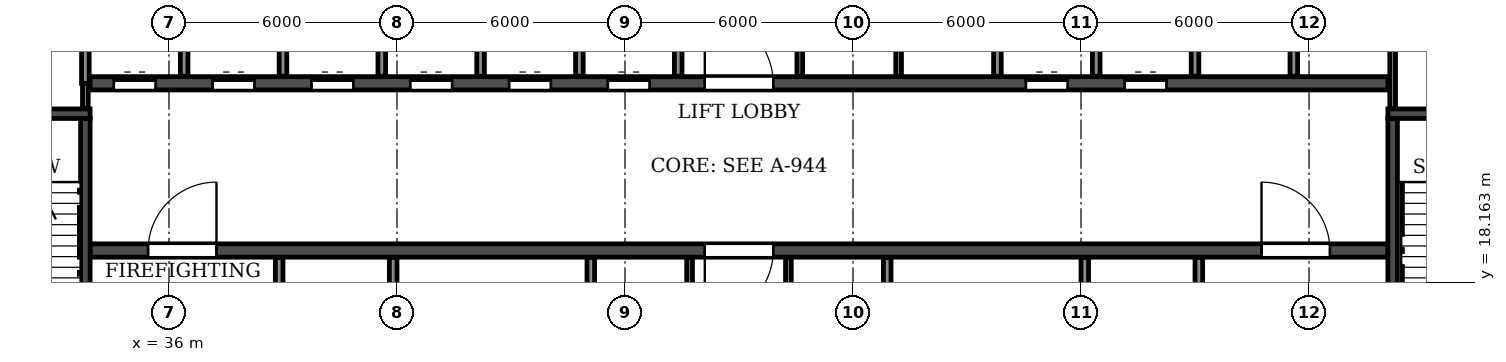
"""IFC4 building model, lengths in metres.
Left out: names, types, materials, properties, quantities, classifications, styles, units other than length and angle.
Written with IfcOpenShell. Run it as: python <this file> out.ifc"""

import sys

from ifc_helpers import new_model, si_unit, direction, frame, frame_2d, origin, place, context, subcontext, project, spatial, rectangle, extrude, element, fill, save


model = new_model("IFC4")
c1 = context("Model", 3, precision=1e-05, world=origin(), true_north=direction((0.0, 1.0)))
c2 = subcontext(c1, "Body", "Model", "MODEL_VIEW")
j1 = project(units=[si_unit("LENGTHUNIT", "METRE"), si_unit("PLANEANGLEUNIT", "RADIAN")], contexts=[c1])
p1 = place(None, origin())
s1 = spatial("IfcSite", under=j1, at=p1, CompositionType="ELEMENT")
p2 = place(p1, origin())
s2 = spatial("IfcBuilding", under=s1, at=p2, CompositionType="ELEMENT")
p3 = place(p2, frame((0.0, 0.0, 261.0)))
s3 = spatial("IfcBuildingStorey", under=s2, at=p3, CompositionType="ELEMENT", Elevation=261.0)
p4 = place(p3, frame((33.925, 19.0, 0.0), z_axis=(0.0, 0.0, 1.0), x_axis=(1.0, 0.0, 0.0)))
e1 = element("IfcWall", 1, at=p4, inside=s3, PredefinedType="SOLIDWALL", context=c2, shape_type="SweptSolid", body=[
    extrude(rectangle(XDim=34.15, YDim=0.35, at=frame_2d((17.075, 0.0))), origin(), (0.0, 0.0, 1.0), 5.7),
])
p5 = place(p4, frame((16.175, 0.0, 0.0)))
e2 = element("IfcOpeningElement", 2, at=p5, cuts=e1, PredefinedType="OPENING", context=c2, shape_type="SweptSolid", body=[
    extrude(rectangle(XDim=1.8, YDim=2.1, at=frame_2d((0.9, 1.05))), frame((0.0, 0.185, 0.0), z_axis=(0.0, -1.0, 0.0), x_axis=(1.0, 0.0, 0.0)), (0.0, 0.0, 1.0), 0.37),
])
p6 = place(p4, frame((1.525, 0.0, 0.0)))
e3 = element("IfcOpeningElement", 3, at=p6, cuts=e1, PredefinedType="OPENING", context=c2, shape_type="SweptSolid", body=[
    extrude(rectangle(XDim=1.8, YDim=2.1, at=frame_2d((0.9, 1.05))), frame((0.0, 0.185, 0.0), z_axis=(0.0, -1.0, 0.0), x_axis=(1.0, 0.0, 0.0)), (0.0, 0.0, 1.0), 0.37),
])
p7 = place(p4, frame((30.825, 0.0, 0.0)))
e4 = element("IfcOpeningElement", 4, at=p7, cuts=e1, PredefinedType="OPENING", context=c2, shape_type="SweptSolid", body=[
    extrude(rectangle(XDim=1.8, YDim=2.1, at=frame_2d((0.9, 1.05))), frame((0.0, 0.185, 0.0), z_axis=(0.0, -1.0, 0.0), x_axis=(1.0, 0.0, 0.0)), (0.0, 0.0, 1.0), 0.37),
])
p8 = place(p3, frame((33.925, 23.4, 0.0), z_axis=(0.0, 0.0, 1.0), x_axis=(1.0, 0.0, 0.0)))
e5 = element("IfcWall", 5, at=p8, inside=s3, PredefinedType="SOLIDWALL", context=c2, shape_type="SweptSolid", body=[
    extrude(rectangle(XDim=34.15, YDim=0.35, at=frame_2d((17.075, 0.0))), origin(), (0.0, 0.0, 1.0), 5.7),
])
p9 = place(p8, frame((16.175, 0.0, 0.0)))
e6 = element("IfcOpeningElement", 6, at=p9, cuts=e5, PredefinedType="OPENING", context=c2, shape_type="SweptSolid", body=[
    extrude(rectangle(XDim=1.8, YDim=2.1, at=frame_2d((0.9, 1.05))), frame((0.0, 0.185, 0.0), z_axis=(0.0, -1.0, 0.0), x_axis=(1.0, 0.0, 0.0)), (0.0, 0.0, 1.0), 0.37),
])
p10 = place(p8, frame((0.625, 0.0, 0.0)))
e7 = element("IfcOpeningElement", 7, at=p10, cuts=e5, PredefinedType="OPENING", context=c2, shape_type="SweptSolid", body=[
    extrude(rectangle(XDim=1.1, YDim=2.1, at=frame_2d((0.55, 1.05))), frame((0.0, 0.185, 0.0), z_axis=(0.0, -1.0, 0.0), x_axis=(1.0, 0.0, 0.0)), (0.0, 0.0, 1.0), 0.37),
])
p11 = place(p8, frame((3.225, 0.0, 0.0)))
e8 = element("IfcOpeningElement", 8, at=p11, cuts=e5, PredefinedType="OPENING", context=c2, shape_type="SweptSolid", body=[
    extrude(rectangle(XDim=1.1, YDim=2.1, at=frame_2d((0.55, 1.05))), frame((0.0, 0.185, 0.0), z_axis=(0.0, -1.0, 0.0), x_axis=(1.0, 0.0, 0.0)), (0.0, 0.0, 1.0), 0.37),
])
p12 = place(p8, frame((5.825, 0.0, 0.0)))
e9 = element("IfcOpeningElement", 9, at=p12, cuts=e5, PredefinedType="OPENING", context=c2, shape_type="SweptSolid", body=[
    extrude(rectangle(XDim=1.1, YDim=2.1, at=frame_2d((0.55, 1.05))), frame((0.0, 0.185, 0.0), z_axis=(0.0, -1.0, 0.0), x_axis=(1.0, 0.0, 0.0)), (0.0, 0.0, 1.0), 0.37),
])
p13 = place(p8, frame((8.425, 0.0, 0.0)))
e10 = element("IfcOpeningElement", 10, at=p13, cuts=e5, PredefinedType="OPENING", context=c2, shape_type="SweptSolid", body=[
    extrude(rectangle(XDim=1.1, YDim=2.1, at=frame_2d((0.55, 1.05))), frame((0.0, 0.185, 0.0), z_axis=(0.0, -1.0, 0.0), x_axis=(1.0, 0.0, 0.0)), (0.0, 0.0, 1.0), 0.37),
])
p14 = place(p8, frame((11.025, 0.0, 0.0)))
e11 = element("IfcOpeningElement", 11, at=p14, cuts=e5, PredefinedType="OPENING", context=c2, shape_type="SweptSolid", body=[
    extrude(rectangle(XDim=1.1, YDim=2.1, at=frame_2d((0.55, 1.05))), frame((0.0, 0.185, 0.0), z_axis=(0.0, -1.0, 0.0), x_axis=(1.0, 0.0, 0.0)), (0.0, 0.0, 1.0), 0.37),
])
p15 = place(p8, frame((13.625, 0.0, 0.0)))
e12 = element("IfcOpeningElement", 12, at=p15, cuts=e5, PredefinedType="OPENING", context=c2, shape_type="SweptSolid", body=[
    extrude(rectangle(XDim=1.1, YDim=2.1, at=frame_2d((0.55, 1.05))), frame((0.0, 0.185, 0.0), z_axis=(0.0, -1.0, 0.0), x_axis=(1.0, 0.0, 0.0)), (0.0, 0.0, 1.0), 0.37),
])
p16 = place(p8, frame((24.625, 0.0, 0.0)))
e13 = element("IfcOpeningElement", 13, at=p16, cuts=e5, PredefinedType="OPENING", context=c2, shape_type="SweptSolid", body=[
    extrude(rectangle(XDim=1.1, YDim=2.1, at=frame_2d((0.55, 1.05))), frame((0.0, 0.185, 0.0), z_axis=(0.0, -1.0, 0.0), x_axis=(1.0, 0.0, 0.0)), (0.0, 0.0, 1.0), 0.37),
])
p17 = place(p8, frame((27.225, 0.0, 0.0)))
e14 = element("IfcOpeningElement", 14, at=p17, cuts=e5, PredefinedType="OPENING", context=c2, shape_type="SweptSolid", body=[
    extrude(rectangle(XDim=1.1, YDim=2.1, at=frame_2d((0.55, 1.05))), frame((0.0, 0.185, 0.0), z_axis=(0.0, -1.0, 0.0), x_axis=(1.0, 0.0, 0.0)), (0.0, 0.0, 1.0), 0.37),
])
p18 = place(p3, frame((33.8, 14.775, 0.0), z_axis=(0.0, 0.0, 1.0), x_axis=(0.0, 1.0, 0.0)))
e15 = element("IfcWall", 15, at=p18, inside=s3, PredefinedType="SOLIDWALL", context=c2, shape_type="SweptSolid", body=[
    extrude(rectangle(XDim=7.7, YDim=0.25, at=frame_2d((3.85, 0.0))), origin(), (0.0, 0.0, 1.0), 5.7),
])
p19 = place(p18, frame((0.525, 0.0, 0.0)))
e16 = element("IfcOpeningElement", 16, at=p19, cuts=e15, PredefinedType="OPENING", context=c2, shape_type="SweptSolid", body=[
    extrude(rectangle(XDim=1.0, YDim=2.1, at=frame_2d((0.5, 1.05))), frame((0.0, 0.135, 0.0), z_axis=(0.0, -1.0, 0.0), x_axis=(1.0, 0.0, 0.0)), (0.0, 0.0, 1.0), 0.27),
])
p20 = place(p3, frame((29.875, 22.6, 0.0), z_axis=(0.0, 0.0, 1.0), x_axis=(1.0, 0.0, 0.0)))
e17 = element("IfcWall", 17, at=p20, inside=s3, PredefinedType="SOLIDWALL", context=c2, shape_type="SweptSolid", body=[
    extrude(rectangle(XDim=4.05, YDim=0.25, at=frame_2d((2.025, 0.0))), origin(), (0.0, 0.0, 1.0), 5.7),
])
p21 = place(p3, frame((68.2, 14.775, 0.0), z_axis=(0.0, 0.0, 1.0), x_axis=(0.0, 1.0, 0.0)))
e18 = element("IfcWall", 18, at=p21, inside=s3, PredefinedType="SOLIDWALL", context=c2, shape_type="SweptSolid", body=[
    extrude(rectangle(XDim=7.7, YDim=0.25, at=frame_2d((3.85, 0.0))), origin(), (0.0, 0.0, 1.0), 5.7),
])
p22 = place(p21, frame((0.525, 0.0, 0.0)))
e19 = element("IfcOpeningElement", 19, at=p22, cuts=e18, PredefinedType="OPENING", context=c2, shape_type="SweptSolid", body=[
    extrude(rectangle(XDim=1.0, YDim=2.1, at=frame_2d((0.5, 1.05))), frame((0.0, 0.135, 0.0), z_axis=(0.0, -1.0, 0.0), x_axis=(1.0, 0.0, 0.0)), (0.0, 0.0, 1.0), 0.27),
])
p23 = place(p3, frame((68.075, 22.6, 0.0), z_axis=(0.0, 0.0, 1.0), x_axis=(1.0, 0.0, 0.0)))
e20 = element("IfcWall", 20, at=p23, inside=s3, PredefinedType="SOLIDWALL", context=c2, shape_type="SweptSolid", body=[
    extrude(rectangle(XDim=4.05, YDim=0.25, at=frame_2d((2.025, 0.0))), origin(), (0.0, 0.0, 1.0), 5.7),
])
for number, where, z_axis, x_axis in (
    (21, (49.7, 14.785, 0.0), (0.0, 0.0, 1.0), (0.0, 1.0, 0.0)),
    (22, (52.3, 14.785, 0.0), (0.0, 0.0, 1.0), (0.0, 1.0, 0.0)),
    (23, (52.6, 23.585, 0.0), (0.0, 0.0, 1.0), (0.0, 1.0, 0.0)),
    (24, (55.2, 23.585, 0.0), (0.0, 0.0, 1.0), (0.0, 1.0, 0.0)),
):
    element("IfcWall", number, at=place(p3, frame(where, z_axis=z_axis, x_axis=x_axis)), inside=s3, PredefinedType="PARTITIONING", context=c2, shape_type="SweptSolid", body=[
        extrude(rectangle(XDim=4.03, YDim=0.15, at=frame_2d((2.015, 0.0))), origin(), (0.0, 0.0, 1.0), 5.7),
    ])
for number, where, z_axis, x_axis in (
    (25, (47.1, 14.785, 0.0), (0.0, 0.0, 1.0), (0.0, 1.0, 0.0)),
    (26, (54.9, 14.785, 0.0), (0.0, 0.0, 1.0), (0.0, 1.0, 0.0)),
    (27, (65.6, 23.585, 0.0), (0.0, 0.0, 1.0), (0.0, 1.0, 0.0)),
):
    element("IfcWall", number, at=place(p3, frame(where, z_axis=z_axis, x_axis=x_axis)), inside=s3, PredefinedType="PARTITIONING", context=c2, shape_type="SweptSolid", body=[
        extrude(rectangle(XDim=4.03, YDim=0.2, at=frame_2d((2.015, 0.0))), origin(), (0.0, 0.0, 1.0), 5.7),
    ])
p24 = place(p3, frame((33.8, 22.735, 0.0), z_axis=(0.0, 0.0, 1.0), x_axis=(0.0, 1.0, 0.0)))
e28 = element("IfcWall", 28, at=p24, inside=s3, PredefinedType="PARTITIONING", context=c2, shape_type="SweptSolid", body=[
    extrude(rectangle(XDim=0.665, YDim=0.15, at=frame_2d((0.333, 0.0))), origin(), (0.0, 0.0, 1.0), 5.7),
])
p25 = place(p3, frame((68.2, 22.735, 0.0), z_axis=(0.0, 0.0, 1.0), x_axis=(0.0, 1.0, 0.0)))
e29 = element("IfcWall", 29, at=p25, inside=s3, PredefinedType="PARTITIONING", context=c2, shape_type="SweptSolid", body=[
    extrude(rectangle(XDim=4.88, YDim=0.15, at=frame_2d((2.44, 0.0))), origin(), (0.0, 0.0, 1.0), 5.7),
])
p26 = place(p3, frame((33.8, 23.4, 0.0), z_axis=(0.0, 0.0, 1.0), x_axis=(0.0, 1.0, 0.0)))
e30 = element("IfcWall", 30, at=p26, inside=s3, PredefinedType="PARTITIONING", context=c2, shape_type="SweptSolid", body=[
    extrude(rectangle(XDim=2.7, YDim=0.2, at=frame_2d((1.35, 0.0))), origin(), (0.0, 0.0, 1.0), 5.7),
])
p27 = place(p3, frame((36.4, 23.585, 0.0), z_axis=(0.0, 0.0, 1.0), x_axis=(0.0, 1.0, 0.0)))
e31 = element("IfcWall", 31, at=p27, inside=s3, PredefinedType="PARTITIONING", context=c2, shape_type="SweptSolid", body=[
    extrude(rectangle(XDim=2.515, YDim=0.2, at=frame_2d((1.258, 0.0))), origin(), (0.0, 0.0, 1.0), 5.7),
])
p28 = place(p3, frame((38.9, 14.785, 0.0), z_axis=(0.0, 0.0, 1.0), x_axis=(0.0, 1.0, 0.0)))
e32 = element("IfcWall", 32, at=p28, inside=s3, PredefinedType="PARTITIONING", context=c2, shape_type="SweptSolid", body=[
    extrude(rectangle(XDim=4.03, YDim=0.2, at=frame_2d((2.015, 0.0))), origin(), (0.0, 0.0, 1.0), 5.7),
])
p29 = place(p28, frame((1.465, 0.0, 0.0)))
e33 = element("IfcOpeningElement", 33, at=p29, cuts=e32, PredefinedType="OPENING", context=c2, shape_type="SweptSolid", body=[
    extrude(rectangle(XDim=1.1, YDim=2.1, at=frame_2d((0.55, 1.05))), frame((0.0, 0.11, 0.0), z_axis=(0.0, -1.0, 0.0), x_axis=(1.0, 0.0, 0.0)), (0.0, 0.0, 1.0), 0.22),
])
for number, where, z_axis, x_axis in (
    (34, (39.0, 23.585, 0.0), (0.0, 0.0, 1.0), (0.0, 1.0, 0.0)),
    (35, (41.6, 23.585, 0.0), (0.0, 0.0, 1.0), (0.0, 1.0, 0.0)),
):
    element("IfcWall", number, at=place(p3, frame(where, z_axis=z_axis, x_axis=x_axis)), inside=s3, PredefinedType="PARTITIONING", context=c2, shape_type="SweptSolid", body=[
        extrude(rectangle(XDim=2.515, YDim=0.2, at=frame_2d((1.258, 0.0))), origin(), (0.0, 0.0, 1.0), 5.7),
    ])
for number, where, z_axis, x_axis in (
    (36, (41.9, 14.785, 0.0), (0.0, 0.0, 1.0), (0.0, 1.0, 0.0)),
    (37, (44.2, 23.585, 0.0), (0.0, 0.0, 1.0), (0.0, 1.0, 0.0)),
    (38, (46.8, 23.585, 0.0), (0.0, 0.0, 1.0), (0.0, 1.0, 0.0)),
):
    element("IfcWall", number, at=place(p3, frame(where, z_axis=z_axis, x_axis=x_axis)), inside=s3, PredefinedType="PARTITIONING", context=c2, shape_type="SweptSolid", body=[
        extrude(rectangle(XDim=4.03, YDim=0.2, at=frame_2d((2.015, 0.0))), origin(), (0.0, 0.0, 1.0), 5.7),
    ])
for number, where, z_axis, x_axis in (
    (39, (49.4, 23.585, 0.0), (0.0, 0.0, 1.0), (0.0, 1.0, 0.0)),
    (40, (57.8, 23.585, 0.0), (0.0, 0.0, 1.0), (0.0, 1.0, 0.0)),
):
    element("IfcWall", number, at=place(p3, frame(where, z_axis=z_axis, x_axis=x_axis)), inside=s3, PredefinedType="PARTITIONING", context=c2, shape_type="SweptSolid", body=[
        extrude(rectangle(XDim=2.515, YDim=0.2, at=frame_2d((1.258, 0.0))), origin(), (0.0, 0.0, 1.0), 5.7),
    ])
p30 = place(p3, frame((60.1, 14.785, 0.0), z_axis=(0.0, 0.0, 1.0), x_axis=(0.0, 1.0, 0.0)))
e41 = element("IfcWall", 41, at=p30, inside=s3, PredefinedType="PARTITIONING", context=c2, shape_type="SweptSolid", body=[
    extrude(rectangle(XDim=4.03, YDim=0.2, at=frame_2d((2.015, 0.0))), origin(), (0.0, 0.0, 1.0), 5.7),
])
for number, where, z_axis, x_axis in (
    (42, (60.4, 23.585, 0.0), (0.0, 0.0, 1.0), (0.0, 1.0, 0.0)),
    (43, (63.0, 23.585, 0.0), (0.0, 0.0, 1.0), (0.0, 1.0, 0.0)),
):
    element("IfcWall", number, at=place(p3, frame(where, z_axis=z_axis, x_axis=x_axis)), inside=s3, PredefinedType="PARTITIONING", context=c2, shape_type="SweptSolid", body=[
        extrude(rectangle(XDim=2.515, YDim=0.2, at=frame_2d((1.258, 0.0))), origin(), (0.0, 0.0, 1.0), 5.7),
    ])
p31 = place(p3, frame((63.1, 14.785, 0.0), z_axis=(0.0, 0.0, 1.0), x_axis=(0.0, 1.0, 0.0)))
e44 = element("IfcWall", 44, at=p31, inside=s3, PredefinedType="PARTITIONING", context=c2, shape_type="SweptSolid", body=[
    extrude(rectangle(XDim=4.03, YDim=0.2, at=frame_2d((2.015, 0.0))), origin(), (0.0, 0.0, 1.0), 5.7),
])
p32 = place(p31, frame((1.465, 0.0, 0.0)))
e45 = element("IfcOpeningElement", 45, at=p32, cuts=e44, PredefinedType="OPENING", context=c2, shape_type="SweptSolid", body=[
    extrude(rectangle(XDim=1.1, YDim=2.1, at=frame_2d((0.55, 1.05))), frame((0.0, 0.11, 0.0), z_axis=(0.0, -1.0, 0.0), x_axis=(1.0, 0.0, 0.0)), (0.0, 0.0, 1.0), 0.22),
])
p33 = place(p9, origin())
e46 = element("IfcDoor", 46, at=p33, inside=s3, OperationType="DOUBLE_DOOR_SINGLE_SWING", PredefinedType="DOOR", context=c2, shape_type="SweptSolid", body=[
    extrude(rectangle(XDim=1.8, YDim=2.1, at=frame_2d((0.9, 1.05))), frame((0.0, 0.025, 0.0), z_axis=(0.0, -1.0, 0.0), x_axis=(1.0, 0.0, 0.0)), (0.0, 0.0, 1.0), 0.05),
])
fill(e6, e46)
p34 = place(p5, frame((1.8, 0.0, 0.0), z_axis=(0.0, 0.0, 1.0), x_axis=(-1.0, 0.0, 0.0)))
e47 = element("IfcDoor", 47, at=p34, inside=s3, OperationType="DOUBLE_DOOR_SINGLE_SWING", PredefinedType="DOOR", context=c2, shape_type="SweptSolid", body=[
    extrude(rectangle(XDim=1.8, YDim=2.1, at=frame_2d((0.9, 1.05))), frame((0.0, 0.025, 0.0), z_axis=(0.0, -1.0, 0.0), x_axis=(1.0, 0.0, 0.0)), (0.0, 0.0, 1.0), 0.05),
])
fill(e2, e47)
p35 = place(p10, origin())
e48 = element("IfcDoor", 48, at=p35, inside=s3, OperationType="DOUBLE_DOOR_SLIDING", PredefinedType="DOOR", context=c2, shape_type="SweptSolid", body=[
    extrude(rectangle(XDim=1.1, YDim=2.1, at=frame_2d((0.55, 1.05))), frame((0.0, 0.025, 0.0), z_axis=(0.0, -1.0, 0.0), x_axis=(1.0, 0.0, 0.0)), (0.0, 0.0, 1.0), 0.05),
])
fill(e7, e48)
p36 = place(p6, origin())
e49 = element("IfcDoor", 49, at=p36, inside=s3, OperationType="DOUBLE_DOOR_SINGLE_SWING", PredefinedType="DOOR", context=c2, shape_type="SweptSolid", body=[
    extrude(rectangle(XDim=1.8, YDim=2.1, at=frame_2d((0.9, 1.05))), frame((0.0, 0.025, 0.0), z_axis=(0.0, -1.0, 0.0), x_axis=(1.0, 0.0, 0.0)), (0.0, 0.0, 1.0), 0.05),
])
fill(e3, e49)
p37 = place(p11, origin())
e50 = element("IfcDoor", 50, at=p37, inside=s3, OperationType="DOUBLE_DOOR_SLIDING", PredefinedType="DOOR", context=c2, shape_type="SweptSolid", body=[
    extrude(rectangle(XDim=1.1, YDim=2.1, at=frame_2d((0.55, 1.05))), frame((0.0, 0.025, 0.0), z_axis=(0.0, -1.0, 0.0), x_axis=(1.0, 0.0, 0.0)), (0.0, 0.0, 1.0), 0.05),
])
fill(e8, e50)
p38 = place(p12, origin())
e51 = element("IfcDoor", 51, at=p38, inside=s3, OperationType="DOUBLE_DOOR_SLIDING", PredefinedType="DOOR", context=c2, shape_type="SweptSolid", body=[
    extrude(rectangle(XDim=1.1, YDim=2.1, at=frame_2d((0.55, 1.05))), frame((0.0, 0.025, 0.0), z_axis=(0.0, -1.0, 0.0), x_axis=(1.0, 0.0, 0.0)), (0.0, 0.0, 1.0), 0.05),
])
fill(e9, e51)
p39 = place(p13, origin())
e52 = element("IfcDoor", 52, at=p39, inside=s3, OperationType="DOUBLE_DOOR_SLIDING", PredefinedType="DOOR", context=c2, shape_type="SweptSolid", body=[
    extrude(rectangle(XDim=1.1, YDim=2.1, at=frame_2d((0.55, 1.05))), frame((0.0, 0.025, 0.0), z_axis=(0.0, -1.0, 0.0), x_axis=(1.0, 0.0, 0.0)), (0.0, 0.0, 1.0), 0.05),
])
fill(e10, e52)
p40 = place(p14, origin())
e53 = element("IfcDoor", 53, at=p40, inside=s3, OperationType="DOUBLE_DOOR_SLIDING", PredefinedType="DOOR", context=c2, shape_type="SweptSolid", body=[
    extrude(rectangle(XDim=1.1, YDim=2.1, at=frame_2d((0.55, 1.05))), frame((0.0, 0.025, 0.0), z_axis=(0.0, -1.0, 0.0), x_axis=(1.0, 0.0, 0.0)), (0.0, 0.0, 1.0), 0.05),
])
fill(e11, e53)
p41 = place(p15, origin())
e54 = element("IfcDoor", 54, at=p41, inside=s3, OperationType="DOUBLE_DOOR_SLIDING", PredefinedType="DOOR", context=c2, shape_type="SweptSolid", body=[
    extrude(rectangle(XDim=1.1, YDim=2.1, at=frame_2d((0.55, 1.05))), frame((0.0, 0.025, 0.0), z_axis=(0.0, -1.0, 0.0), x_axis=(1.0, 0.0, 0.0)), (0.0, 0.0, 1.0), 0.05),
])
fill(e12, e54)
p42 = place(p16, origin())
e55 = element("IfcDoor", 55, at=p42, inside=s3, OperationType="DOUBLE_DOOR_SLIDING", PredefinedType="DOOR", context=c2, shape_type="SweptSolid", body=[
    extrude(rectangle(XDim=1.1, YDim=2.1, at=frame_2d((0.55, 1.05))), frame((0.0, 0.025, 0.0), z_axis=(0.0, -1.0, 0.0), x_axis=(1.0, 0.0, 0.0)), (0.0, 0.0, 1.0), 0.05),
])
fill(e13, e55)
p43 = place(p17, origin())
e56 = element("IfcDoor", 56, at=p43, inside=s3, OperationType="DOUBLE_DOOR_SLIDING", PredefinedType="DOOR", context=c2, shape_type="SweptSolid", body=[
    extrude(rectangle(XDim=1.1, YDim=2.1, at=frame_2d((0.55, 1.05))), frame((0.0, 0.025, 0.0), z_axis=(0.0, -1.0, 0.0), x_axis=(1.0, 0.0, 0.0)), (0.0, 0.0, 1.0), 0.05),
])
fill(e14, e56)
p44 = place(p7, origin())
e57 = element("IfcDoor", 57, at=p44, inside=s3, OperationType="DOUBLE_DOOR_SINGLE_SWING", PredefinedType="DOOR", context=c2, shape_type="SweptSolid", body=[
    extrude(rectangle(XDim=1.8, YDim=2.1, at=frame_2d((0.9, 1.05))), frame((0.0, 0.025, 0.0), z_axis=(0.0, -1.0, 0.0), x_axis=(1.0, 0.0, 0.0)), (0.0, 0.0, 1.0), 0.05),
])
fill(e4, e57)
save(model, sys.argv[1])
